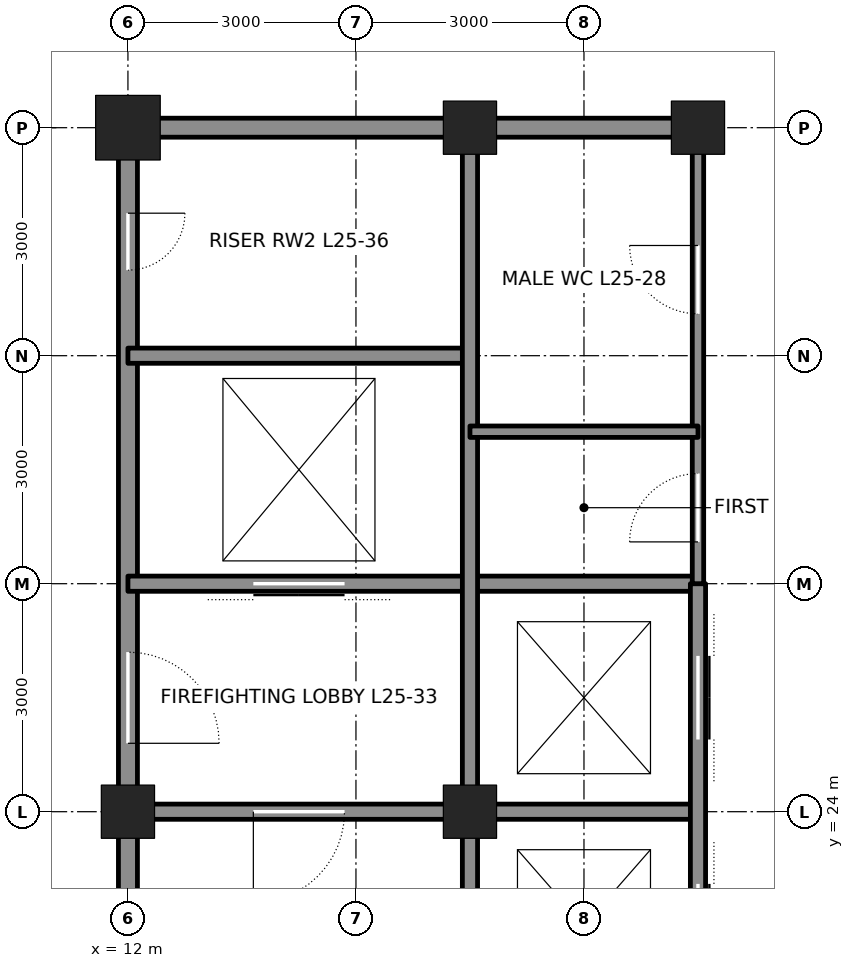
"""IFC4 building model, lengths in metres.
Left out: names, types, materials, properties, quantities, classifications, styles, units other than length and angle.
Written with IfcOpenShell. Run it as: python <this file> out.ifc"""

import sys

from ifc_helpers import new_model, si_unit, direction, frame, frame_2d, origin, origin_2d, place, context, subcontext, project, spatial, rectangle, hollow_rectangle, extrude, element, fill, save


model = new_model("IFC4")
c1 = context("Model", 3, precision=1e-05, world=origin(), true_north=direction((0.0, 1.0)))
c2 = subcontext(c1, "Body", "Model", "MODEL_VIEW")
j1 = project(units=[si_unit("LENGTHUNIT", "METRE"), si_unit("PLANEANGLEUNIT", "RADIAN")], contexts=[c1])
p1 = place(None, origin())
s1 = spatial("IfcSite", under=j1, at=p1, CompositionType="ELEMENT")
p2 = place(p1, origin())
s2 = spatial("IfcBuilding", under=s1, at=p2, CompositionType="ELEMENT")
p3 = place(p2, frame((0.0, 0.0, 119.4)))
s3 = spatial("IfcBuildingStorey", under=s2, at=p3, CompositionType="ELEMENT", Elevation=119.4)
p4 = place(p3, frame((12.0, 33.0, 0.0), z_axis=(0.0, 0.0, 1.0), x_axis=(1.0, 0.0, 0.0)))
e1 = element("IfcColumn", 1, at=p4, inside=s3, PredefinedType="COLUMN", context=c2, shape_type="SweptSolid", body=[
    extrude(hollow_rectangle(XDim=0.85, YDim=0.85, WallThickness=0.085, at=origin_2d()), origin(), (0.0, 0.0, 1.0), 4.2),
])
for number, where, z_axis, x_axis in (
    (2, (16.5, 33.0, 0.0), (0.0, 0.0, 1.0), (1.0, 0.0, 0.0)),
    (3, (19.5, 33.0, 0.0), (0.0, 0.0, 1.0), (1.0, 0.0, 0.0)),
    (4, (12.0, 24.0, 0.0), (0.0, 0.0, 1.0), (1.0, 0.0, 0.0)),
    (5, (16.5, 24.0, 0.0), (0.0, 0.0, 1.0), (1.0, 0.0, 0.0)),
):
    element("IfcColumn", number, at=place(p3, frame(where, z_axis=z_axis, x_axis=x_axis)), inside=s3, PredefinedType="COLUMN", context=c2, shape_type="SweptSolid", body=[
        extrude(hollow_rectangle(XDim=0.7, YDim=0.7, WallThickness=0.07, at=origin_2d()), origin(), (0.0, 0.0, 1.0), 4.2),
    ])
p5 = place(p3, frame((12.0, 21.25, 0.0), z_axis=(0.0, 0.0, 1.0), x_axis=(0.0, 1.0, 0.0)))
e6 = element("IfcWall", 6, at=p5, inside=s3, PredefinedType="SOLIDWALL", context=c2, shape_type="SweptSolid", body=[
    extrude(rectangle(XDim=2.5, YDim=0.25, at=frame_2d((1.25, 0.0))), origin(), (0.0, 0.0, 1.0), 3.113),
])
p6 = place(p3, frame((12.0, 24.25, 0.0), z_axis=(0.0, 0.0, 1.0), x_axis=(0.0, 1.0, 0.0)))
e7 = element("IfcWall", 7, at=p6, inside=s3, PredefinedType="SOLIDWALL", context=c2, shape_type="SweptSolid", body=[
    extrude(rectangle(XDim=8.5, YDim=0.25, at=frame_2d((4.25, 0.0))), origin(), (0.0, 0.0, 1.0), 3.113),
])
p7 = place(p6, frame((0.65, 0.0, 0.0)))
e8 = element("IfcOpeningElement", 8, at=p7, cuts=e7, PredefinedType="OPENING", context=c2, shape_type="SweptSolid", body=[
    extrude(rectangle(XDim=1.2, YDim=2.1, at=frame_2d((0.6, 1.05))), frame((0.0, 0.135, 0.0), z_axis=(0.0, -1.0, 0.0), x_axis=(1.0, 0.0, 0.0)), (0.0, 0.0, 1.0), 0.27),
])
p8 = place(p6, frame((6.875, 0.0, 0.0)))
e9 = element("IfcOpeningElement", 9, at=p8, cuts=e7, PredefinedType="OPENING", context=c2, shape_type="SweptSolid", body=[
    extrude(rectangle(XDim=0.75, YDim=2.1, at=frame_2d((0.375, 1.05))), frame((0.0, 0.135, 0.0), z_axis=(0.0, -1.0, 0.0), x_axis=(1.0, 0.0, 0.0)), (0.0, 0.0, 1.0), 0.27),
])
p9 = place(p3, frame((12.25, 24.0, 0.0), z_axis=(0.0, 0.0, 1.0), x_axis=(1.0, 0.0, 0.0)))
e10 = element("IfcWall", 10, at=p9, inside=s3, PredefinedType="SOLIDWALL", context=c2, shape_type="SweptSolid", body=[
    extrude(rectangle(XDim=4.0, YDim=0.2, at=frame_2d((2.0, 0.0))), origin(), (0.0, 0.0, 1.0), 3.09),
])
p10 = place(p9, frame((1.4, 0.0, 0.0)))
e11 = element("IfcOpeningElement", 11, at=p10, cuts=e10, PredefinedType="OPENING", context=c2, shape_type="SweptSolid", body=[
    extrude(rectangle(XDim=1.2, YDim=2.1, at=frame_2d((0.6, 1.05))), frame((0.0, 0.11, 0.0), z_axis=(0.0, -1.0, 0.0), x_axis=(1.0, 0.0, 0.0)), (0.0, 0.0, 1.0), 0.22),
])
p11 = place(p3, frame((16.75, 24.0, 0.0), z_axis=(0.0, 0.0, 1.0), x_axis=(1.0, 0.0, 0.0)))
e12 = element("IfcWall", 12, at=p11, inside=s3, PredefinedType="SOLIDWALL", context=c2, shape_type="SweptSolid", body=[
    extrude(rectangle(XDim=2.75, YDim=0.2, at=frame_2d((1.375, 0.0))), origin(), (0.0, 0.0, 1.0), 3.09),
])
p12 = place(p3, frame((12.0, 27.0, 0.0), z_axis=(0.0, 0.0, 1.0), x_axis=(1.0, 0.0, 0.0)))
e13 = element("IfcWall", 13, at=p12, inside=s3, PredefinedType="SOLIDWALL", context=c2, shape_type="SweptSolid", body=[
    extrude(rectangle(XDim=7.5, YDim=0.2, at=frame_2d((3.75, 0.0))), origin(), (0.0, 0.0, 1.0), 4.04),
])
p13 = place(p12, frame((1.65, 0.0, 0.0)))
e14 = element("IfcOpeningElement", 14, at=p13, cuts=e13, PredefinedType="OPENING", context=c2, shape_type="SweptSolid", body=[
    extrude(rectangle(XDim=1.2, YDim=2.1, at=frame_2d((0.6, 1.05))), frame((0.0, 0.11, 0.0), z_axis=(0.0, -1.0, 0.0), x_axis=(1.0, 0.0, 0.0)), (0.0, 0.0, 1.0), 0.22),
])
p14 = place(p3, frame((12.0, 30.0, 0.0), z_axis=(0.0, 0.0, 1.0), x_axis=(1.0, 0.0, 0.0)))
e15 = element("IfcWall", 15, at=p14, inside=s3, PredefinedType="SOLIDWALL", context=c2, shape_type="SweptSolid", body=[
    extrude(rectangle(XDim=4.5, YDim=0.2, at=frame_2d((2.25, 0.0))), origin(), (0.0, 0.0, 1.0), 4.04),
])
p15 = place(p3, frame((12.25, 33.0, 0.0), z_axis=(0.0, 0.0, 1.0), x_axis=(1.0, 0.0, 0.0)))
e16 = element("IfcWall", 16, at=p15, inside=s3, PredefinedType="SOLIDWALL", context=c2, shape_type="SweptSolid", body=[
    extrude(rectangle(XDim=4.0, YDim=0.25, at=frame_2d((2.0, 0.0))), origin(), (0.0, 0.0, 1.0), 3.182),
])
p16 = place(p3, frame((16.75, 33.0, 0.0), z_axis=(0.0, 0.0, 1.0), x_axis=(1.0, 0.0, 0.0)))
e17 = element("IfcWall", 17, at=p16, inside=s3, PredefinedType="SOLIDWALL", context=c2, shape_type="SweptSolid", body=[
    extrude(rectangle(XDim=2.5, YDim=0.25, at=frame_2d((1.25, 0.0))), origin(), (0.0, 0.0, 1.0), 3.182),
])
p17 = place(p3, frame((16.5, 21.25, 0.0), z_axis=(0.0, 0.0, 1.0), x_axis=(0.0, 1.0, 0.0)))
e18 = element("IfcWall", 18, at=p17, inside=s3, PredefinedType="SOLIDWALL", context=c2, shape_type="SweptSolid", body=[
    extrude(rectangle(XDim=2.5, YDim=0.2, at=frame_2d((1.25, 0.0))), origin(), (0.0, 0.0, 1.0), 3.113),
])
p18 = place(p3, frame((16.5, 24.25, 0.0), z_axis=(0.0, 0.0, 1.0), x_axis=(0.0, 1.0, 0.0)))
e19 = element("IfcWall", 19, at=p18, inside=s3, PredefinedType="SOLIDWALL", context=c2, shape_type="SweptSolid", body=[
    extrude(rectangle(XDim=8.5, YDim=0.2, at=frame_2d((4.25, 0.0))), origin(), (0.0, 0.0, 1.0), 3.113),
])
p19 = place(p3, frame((19.5, 15.0, 0.0), z_axis=(0.0, 0.0, 1.0), x_axis=(0.0, 1.0, 0.0)))
e20 = element("IfcWall", 20, at=p19, inside=s3, PredefinedType="SOLIDWALL", context=c2, shape_type="SweptSolid", body=[
    extrude(rectangle(XDim=12.0, YDim=0.2, at=frame_2d((6.0, 0.0))), origin(), (0.0, 0.0, 1.0), 3.065),
])
p20 = place(p19, frame((0.95, 0.0, 0.0)))
e21 = element("IfcOpeningElement", 21, at=p20, cuts=e20, PredefinedType="OPENING", context=c2, shape_type="SweptSolid", body=[
    extrude(rectangle(XDim=1.1, YDim=2.1, at=frame_2d((0.55, 1.05))), frame((0.0, 0.11, 0.0), z_axis=(0.0, -1.0, 0.0), x_axis=(1.0, 0.0, 0.0)), (0.0, 0.0, 1.0), 0.22),
])
p21 = place(p19, frame((3.95, 0.0, 0.0)))
e22 = element("IfcOpeningElement", 22, at=p21, cuts=e20, PredefinedType="OPENING", context=c2, shape_type="SweptSolid", body=[
    extrude(rectangle(XDim=1.1, YDim=2.1, at=frame_2d((0.55, 1.05))), frame((0.0, 0.11, 0.0), z_axis=(0.0, -1.0, 0.0), x_axis=(1.0, 0.0, 0.0)), (0.0, 0.0, 1.0), 0.22),
])
p22 = place(p19, frame((6.95, 0.0, 0.0)))
e23 = element("IfcOpeningElement", 23, at=p22, cuts=e20, PredefinedType="OPENING", context=c2, shape_type="SweptSolid", body=[
    extrude(rectangle(XDim=1.1, YDim=2.1, at=frame_2d((0.55, 1.05))), frame((0.0, 0.11, 0.0), z_axis=(0.0, -1.0, 0.0), x_axis=(1.0, 0.0, 0.0)), (0.0, 0.0, 1.0), 0.22),
])
p23 = place(p19, frame((9.95, 0.0, 0.0)))
e24 = element("IfcOpeningElement", 24, at=p23, cuts=e20, PredefinedType="OPENING", context=c2, shape_type="SweptSolid", body=[
    extrude(rectangle(XDim=1.1, YDim=2.1, at=frame_2d((0.55, 1.05))), frame((0.0, 0.11, 0.0), z_axis=(0.0, -1.0, 0.0), x_axis=(1.0, 0.0, 0.0)), (0.0, 0.0, 1.0), 0.22),
])
p24 = place(p3, frame((19.5, 27.0, 0.0), z_axis=(0.0, 0.0, 1.0), x_axis=(0.0, 1.0, 0.0)))
e25 = element("IfcWall", 25, at=p24, inside=s3, PredefinedType="PARTITIONING", context=c2, shape_type="SweptSolid", body=[
    extrude(rectangle(XDim=5.75, YDim=0.15, at=frame_2d((2.875, 0.0))), origin(), (0.0, 0.0, 1.0), 3.065),
])
p25 = place(p24, frame((0.55, 0.0, 0.0)))
e26 = element("IfcOpeningElement", 26, at=p25, cuts=e25, PredefinedType="OPENING", context=c2, shape_type="SweptSolid", body=[
    extrude(rectangle(XDim=0.9, YDim=2.1, at=frame_2d((0.45, 1.05))), frame((0.0, 0.085, 0.0), z_axis=(0.0, -1.0, 0.0), x_axis=(1.0, 0.0, 0.0)), (0.0, 0.0, 1.0), 0.17),
])
p26 = place(p24, frame((3.55, 0.0, 0.0)))
e27 = element("IfcOpeningElement", 27, at=p26, cuts=e25, PredefinedType="OPENING", context=c2, shape_type="SweptSolid", body=[
    extrude(rectangle(XDim=0.9, YDim=2.1, at=frame_2d((0.45, 1.05))), frame((0.0, 0.085, 0.0), z_axis=(0.0, -1.0, 0.0), x_axis=(1.0, 0.0, 0.0)), (0.0, 0.0, 1.0), 0.17),
])
p27 = place(p3, frame((16.5, 29.0, 0.0), z_axis=(0.0, 0.0, 1.0), x_axis=(1.0, 0.0, 0.0)))
e28 = element("IfcWall", 28, at=p27, inside=s3, PredefinedType="PARTITIONING", context=c2, shape_type="SweptSolid", body=[
    extrude(rectangle(XDim=3.0, YDim=0.15, at=frame_2d((1.5, 0.0))), origin(), (0.0, 0.0, 1.0), 4.04),
])
p28 = place(p10, frame((1.2, 0.0, 0.0), z_axis=(0.0, 0.0, 1.0), x_axis=(-1.0, 0.0, 0.0)))
e29 = element("IfcDoor", 29, at=p28, inside=s3, OperationType="SINGLE_SWING_RIGHT", PredefinedType="DOOR", context=c2, shape_type="SweptSolid", body=[
    extrude(rectangle(XDim=1.2, YDim=2.1, at=frame_2d((0.6, 1.05))), frame((0.0, 0.025, 0.0), z_axis=(0.0, -1.0, 0.0), x_axis=(1.0, 0.0, 0.0)), (0.0, 0.0, 1.0), 0.05),
])
fill(e11, e29)
p29 = place(p7, frame((1.2, 0.0, 0.0), z_axis=(0.0, 0.0, 1.0), x_axis=(-1.0, 0.0, 0.0)))
e30 = element("IfcDoor", 30, at=p29, inside=s3, OperationType="SINGLE_SWING_RIGHT", PredefinedType="DOOR", context=c2, shape_type="SweptSolid", body=[
    extrude(rectangle(XDim=1.2, YDim=2.1, at=frame_2d((0.6, 1.05))), frame((0.0, 0.025, 0.0), z_axis=(0.0, -1.0, 0.0), x_axis=(1.0, 0.0, 0.0)), (0.0, 0.0, 1.0), 0.05),
])
fill(e8, e30)
p30 = place(p13, origin())
e31 = element("IfcDoor", 31, at=p30, inside=s3, OperationType="DOUBLE_DOOR_SLIDING", PredefinedType="DOOR", context=c2, shape_type="SweptSolid", body=[
    extrude(rectangle(XDim=1.2, YDim=2.1, at=frame_2d((0.6, 1.05))), frame((0.0, 0.025, 0.0), z_axis=(0.0, -1.0, 0.0), x_axis=(1.0, 0.0, 0.0)), (0.0, 0.0, 1.0), 0.05),
])
fill(e14, e31)
p31 = place(p8, frame((0.75, 0.0, 0.0), z_axis=(0.0, 0.0, 1.0), x_axis=(-1.0, 0.0, 0.0)))
e32 = element("IfcDoor", 32, at=p31, inside=s3, OperationType="SINGLE_SWING_LEFT", PredefinedType="DOOR", context=c2, shape_type="SweptSolid", body=[
    extrude(rectangle(XDim=0.75, YDim=2.1, at=frame_2d((0.375, 1.05))), frame((0.0, 0.025, 0.0), z_axis=(0.0, -1.0, 0.0), x_axis=(1.0, 0.0, 0.0)), (0.0, 0.0, 1.0), 0.05),
])
fill(e9, e32)
p32 = place(p25, origin())
e33 = element("IfcDoor", 33, at=p32, inside=s3, OperationType="SINGLE_SWING_LEFT", PredefinedType="DOOR", context=c2, shape_type="SweptSolid", body=[
    extrude(rectangle(XDim=0.9, YDim=2.1, at=frame_2d((0.45, 1.05))), frame((0.0, 0.025, 0.0), z_axis=(0.0, -1.0, 0.0), x_axis=(1.0, 0.0, 0.0)), (0.0, 0.0, 1.0), 0.05),
])
fill(e26, e33)
p33 = place(p26, origin())
e34 = element("IfcDoor", 34, at=p33, inside=s3, OperationType="SINGLE_SWING_RIGHT", PredefinedType="DOOR", context=c2, shape_type="SweptSolid", body=[
    extrude(rectangle(XDim=0.9, YDim=2.1, at=frame_2d((0.45, 1.05))), frame((0.0, 0.025, 0.0), z_axis=(0.0, -1.0, 0.0), x_axis=(1.0, 0.0, 0.0)), (0.0, 0.0, 1.0), 0.05),
])
fill(e27, e34)
p34 = place(p22, origin())
e35 = element("IfcDoor", 35, at=p34, inside=s3, OperationType="DOUBLE_DOOR_SLIDING", PredefinedType="DOOR", context=c2, shape_type="SweptSolid", body=[
    extrude(rectangle(XDim=1.1, YDim=2.1, at=frame_2d((0.55, 1.05))), frame((0.0, 0.025, 0.0), z_axis=(0.0, -1.0, 0.0), x_axis=(1.0, 0.0, 0.0)), (0.0, 0.0, 1.0), 0.05),
])
fill(e23, e35)
p35 = place(p23, origin())
e36 = element("IfcDoor", 36, at=p35, inside=s3, OperationType="DOUBLE_DOOR_SLIDING", PredefinedType="DOOR", context=c2, shape_type="SweptSolid", body=[
    extrude(rectangle(XDim=1.1, YDim=2.1, at=frame_2d((0.55, 1.05))), frame((0.0, 0.025, 0.0), z_axis=(0.0, -1.0, 0.0), x_axis=(1.0, 0.0, 0.0)), (0.0, 0.0, 1.0), 0.05),
])
fill(e24, e36)
save(model, sys.argv[1])
